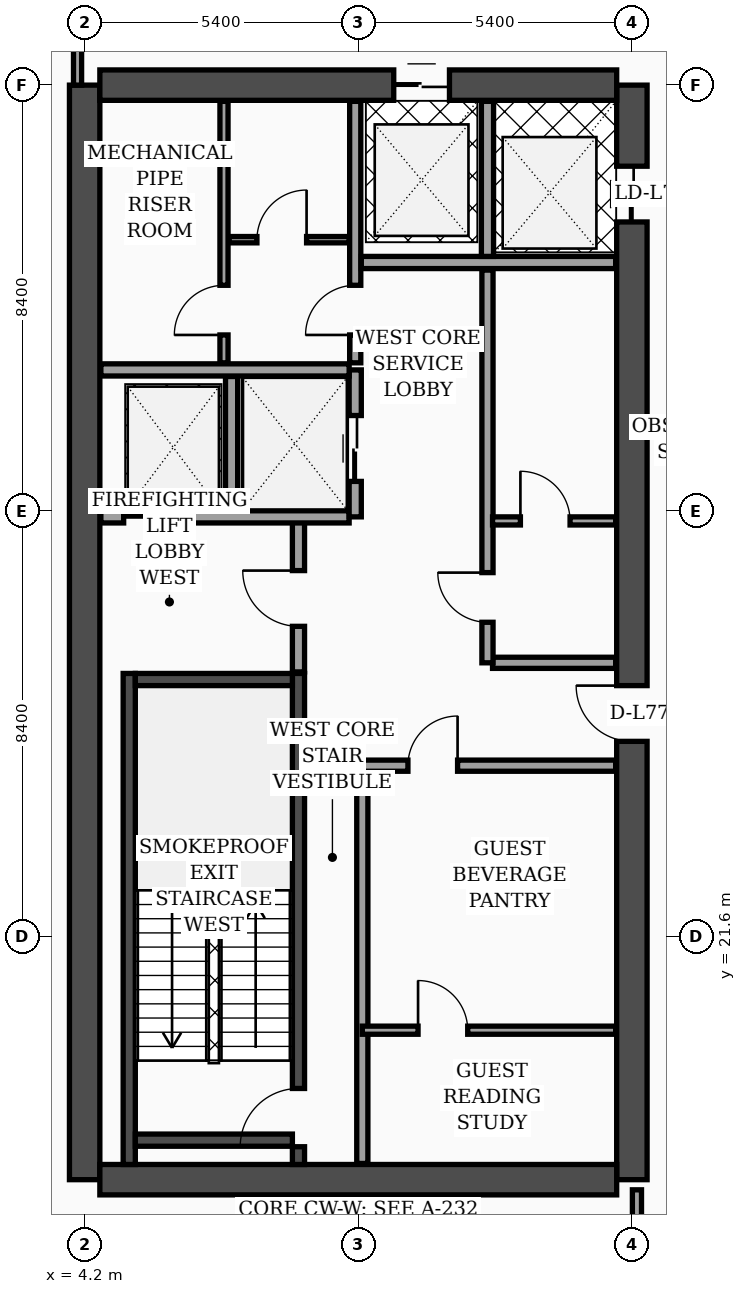
"""IFC4 building model, lengths in metres.
Left out: names, types, materials, properties, quantities, classifications, styles, units other than length and angle.
Written with IfcOpenShell. Run it as: python <this file> out.ifc"""

import sys

from ifc_helpers import new_model, si_unit, direction, frame, frame_2d, origin, place, context, subcontext, project, spatial, rectangle, extrude, element, fill, save


model = new_model("IFC4")
c1 = context("Model", 3, precision=1e-05, world=origin(), true_north=direction((0.0, 1.0)))
c2 = subcontext(c1, "Body", "Model", "MODEL_VIEW")
j1 = project(units=[si_unit("LENGTHUNIT", "METRE"), si_unit("PLANEANGLEUNIT", "RADIAN")], contexts=[c1])
p1 = place(None, origin())
s1 = spatial("IfcSite", under=j1, at=p1, CompositionType="ELEMENT")
p2 = place(p1, origin())
s2 = spatial("IfcBuilding", under=s1, at=p2, CompositionType="ELEMENT")
p3 = place(p2, frame((0.0, 0.0, 311.5)))
s3 = spatial("IfcBuildingStorey", under=s2, at=p3, CompositionType="ELEMENT", Elevation=311.5)
p4 = place(p3, frame((4.2, 16.8, 0.0), z_axis=(0.0, 0.0, 1.0), x_axis=(0.0, 1.0, 0.0)))
e1 = element("IfcWall", 1, at=p4, inside=s3, PredefinedType="SHEAR", context=c2, shape_type="SweptSolid", body=[
    extrude(rectangle(XDim=21.6, YDim=0.6, at=frame_2d((10.8, 0.0))), origin(), (0.0, 0.0, 1.0), 4.26),
])
p5 = place(p3, frame((15.0, 16.8, 0.0), z_axis=(0.0, 0.0, 1.0), x_axis=(0.0, 1.0, 0.0)))
e2 = element("IfcWall", 2, at=p5, inside=s3, PredefinedType="SHEAR", context=c2, shape_type="SweptSolid", body=[
    extrude(rectangle(XDim=21.6, YDim=0.6, at=frame_2d((10.8, 0.0))), origin(), (0.0, 0.0, 1.0), 4.26),
])
p6 = place(p5, frame((8.65, 0.0, 0.0)))
e3 = element("IfcOpeningElement", 3, at=p6, cuts=e2, PredefinedType="OPENING", context=c2, shape_type="SweptSolid", body=[
    extrude(rectangle(XDim=1.1, YDim=2.2, at=frame_2d((0.55, 1.1))), frame((0.0, 0.31, 0.0), z_axis=(0.0, -1.0, 0.0), x_axis=(1.0, 0.0, 0.0)), (0.0, 0.0, 1.0), 0.62),
])
p7 = place(p5, frame((18.9, 0.0, 0.0)))
e4 = element("IfcOpeningElement", 4, at=p7, cuts=e2, PredefinedType="OPENING", context=c2, shape_type="SweptSolid", body=[
    extrude(rectangle(XDim=1.1, YDim=2.2, at=frame_2d((0.55, 1.1))), frame((0.0, 0.31, 0.0), z_axis=(0.0, -1.0, 0.0), x_axis=(1.0, 0.0, 0.0)), (0.0, 0.0, 1.0), 0.62),
])
p8 = place(p3, frame((4.5, 38.4, 0.0), z_axis=(0.0, 0.0, 1.0), x_axis=(1.0, 0.0, 0.0)))
e5 = element("IfcWall", 5, at=p8, inside=s3, PredefinedType="SHEAR", context=c2, shape_type="SweptSolid", body=[
    extrude(rectangle(XDim=10.2, YDim=0.6, at=frame_2d((5.1, 0.0))), origin(), (0.0, 0.0, 1.0), 4.26),
])
p9 = place(p8, frame((5.8, 0.0, 0.0)))
e6 = element("IfcOpeningElement", 6, at=p9, cuts=e5, PredefinedType="OPENING", context=c2, shape_type="SweptSolid", body=[
    extrude(rectangle(XDim=1.1, YDim=2.2, at=frame_2d((0.55, 1.1))), frame((0.0, 0.31, 0.0), z_axis=(0.0, -1.0, 0.0), x_axis=(1.0, 0.0, 0.0)), (0.0, 0.0, 1.0), 0.62),
])
p10 = place(p3, frame((4.5, 16.8, 0.0), z_axis=(0.0, 0.0, 1.0), x_axis=(1.0, 0.0, 0.0)))
e7 = element("IfcWall", 7, at=p10, inside=s3, PredefinedType="SHEAR", context=c2, shape_type="SweptSolid", body=[
    extrude(rectangle(XDim=10.2, YDim=0.6, at=frame_2d((5.1, 0.0))), origin(), (0.0, 0.0, 1.0), 4.26),
])
p11 = place(p3, frame((5.08, 17.1, 0.0), z_axis=(0.0, 0.0, 1.0), x_axis=(0.0, 1.0, 0.0)))
e8 = element("IfcWall", 8, at=p11, inside=s3, PredefinedType="SOLIDWALL", context=c2, shape_type="SweptSolid", body=[
    extrude(rectangle(XDim=9.69, YDim=0.24, at=frame_2d((4.845, 0.0))), origin(), (0.0, 0.0, 1.0), 4.26),
])
p12 = place(p3, frame((8.42, 17.1, 0.0), z_axis=(0.0, 0.0, 1.0), x_axis=(0.0, 1.0, 0.0)))
e9 = element("IfcWall", 9, at=p12, inside=s3, PredefinedType="SOLIDWALL", context=c2, shape_type="SweptSolid", body=[
    extrude(rectangle(XDim=9.69, YDim=0.24, at=frame_2d((4.845, 0.0))), origin(), (0.0, 0.0, 1.0), 4.26),
])
p13 = place(p12, frame((0.35, 0.0, 0.0)))
e10 = element("IfcOpeningElement", 10, at=p13, cuts=e9, PredefinedType="OPENING", context=c2, shape_type="SweptSolid", body=[
    extrude(rectangle(XDim=1.15, YDim=2.2, at=frame_2d((0.575, 1.1))), frame((0.0, 0.13, 0.0), z_axis=(0.0, -1.0, 0.0), x_axis=(1.0, 0.0, 0.0)), (0.0, 0.0, 1.0), 0.26),
])
for number, where, z_axis, x_axis in (
    (11, (5.2, 17.58, 0.0), (0.0, 0.0, 1.0), (1.0, 0.0, 0.0)),
    (12, (5.2, 26.67, 0.0), (0.0, 0.0, 1.0), (1.0, 0.0, 0.0)),
):
    element("IfcWall", number, at=place(p3, frame(where, z_axis=z_axis, x_axis=x_axis)), inside=s3, PredefinedType="SOLIDWALL", context=c2, shape_type="SweptSolid", body=[
        extrude(rectangle(XDim=3.1, YDim=0.24, at=frame_2d((1.55, 0.0))), origin(), (0.0, 0.0, 1.0), 4.26),
    ])
p14 = place(p3, frame((8.42, 26.82, 0.0), z_axis=(0.0, 0.0, 1.0), x_axis=(0.0, 1.0, 0.0)))
e13 = element("IfcWall", 13, at=p14, inside=s3, PredefinedType="SOLIDWALL", context=c2, shape_type="SweptSolid", body=[
    extrude(rectangle(XDim=3.0, YDim=0.24, at=frame_2d((1.5, 0.0))), origin(), (0.0, 0.0, 1.0), 4.26),
])
p15 = place(p14, frame((0.9, 0.0, 0.0)))
e14 = element("IfcOpeningElement", 14, at=p15, cuts=e13, PredefinedType="OPENING", context=c2, shape_type="SweptSolid", body=[
    extrude(rectangle(XDim=1.1, YDim=2.2, at=frame_2d((0.55, 1.1))), frame((0.0, 0.13, 0.0), z_axis=(0.0, -1.0, 0.0), x_axis=(1.0, 0.0, 0.0)), (0.0, 0.0, 1.0), 0.26),
])
p16 = place(p3, frame((4.52, 29.88, 0.0), z_axis=(0.0, 0.0, 1.0), x_axis=(1.0, 0.0, 0.0)))
e15 = element("IfcWall", 15, at=p16, inside=s3, PredefinedType="SOLIDWALL", context=c2, shape_type="SweptSolid", body=[
    extrude(rectangle(XDim=4.9, YDim=0.24, at=frame_2d((2.45, 0.0))), origin(), (0.0, 0.0, 1.0), 4.26),
])
p17 = place(p16, frame((0.45, 0.0, 0.0)))
e16 = element("IfcOpeningElement", 16, at=p17, cuts=e15, PredefinedType="OPENING", context=c2, shape_type="SweptSolid", body=[
    extrude(rectangle(XDim=1.3, YDim=2.35, at=frame_2d((0.65, 1.175))), frame((0.0, 0.13, 0.0), z_axis=(0.0, -1.0, 0.0), x_axis=(1.0, 0.0, 0.0)), (0.0, 0.0, 1.0), 0.26),
])
p18 = place(p3, frame((7.1, 30.02, 0.0), z_axis=(0.0, 0.0, 1.0), x_axis=(0.0, 1.0, 0.0)))
e17 = element("IfcWall", 17, at=p18, inside=s3, PredefinedType="SOLIDWALL", context=c2, shape_type="SweptSolid", body=[
    extrude(rectangle(XDim=2.63, YDim=0.24, at=frame_2d((1.315, 0.0))), origin(), (0.0, 0.0, 1.0), 4.26),
])
p19 = place(p3, frame((9.54, 29.88, 0.0), z_axis=(0.0, 0.0, 1.0), x_axis=(0.0, 1.0, 0.0)))
e18 = element("IfcWall", 18, at=p19, inside=s3, PredefinedType="SOLIDWALL", context=c2, shape_type="SweptSolid", body=[
    extrude(rectangle(XDim=2.9, YDim=0.24, at=frame_2d((1.45, 0.0))), origin(), (0.0, 0.0, 1.0), 4.26),
])
p20 = place(p19, frame((0.7, 0.0, 0.0)))
e19 = element("IfcOpeningElement", 19, at=p20, cuts=e18, PredefinedType="OPENING", context=c2, shape_type="SweptSolid", body=[
    extrude(rectangle(XDim=1.3, YDim=2.35, at=frame_2d((0.65, 1.175))), frame((0.0, 0.13, 0.0), z_axis=(0.0, -1.0, 0.0), x_axis=(1.0, 0.0, 0.0)), (0.0, 0.0, 1.0), 0.26),
])
p21 = place(p3, frame((4.52, 32.78, 0.0), z_axis=(0.0, 0.0, 1.0), x_axis=(1.0, 0.0, 0.0)))
e20 = element("IfcWall", 20, at=p21, inside=s3, PredefinedType="SOLIDWALL", context=c2, shape_type="SweptSolid", body=[
    extrude(rectangle(XDim=4.9, YDim=0.24, at=frame_2d((2.45, 0.0))), origin(), (0.0, 0.0, 1.0), 3.89),
])
p22 = place(p3, frame((9.68, 17.12, 0.0), z_axis=(0.0, 0.0, 1.0), x_axis=(0.0, 1.0, 0.0)))
e21 = element("IfcWall", 21, at=p22, inside=s3, PredefinedType="SOLIDWALL", context=c2, shape_type="SweptSolid", body=[
    extrude(rectangle(XDim=7.88, YDim=0.22, at=frame_2d((3.94, 0.0))), origin(), (0.0, 0.0, 1.0), 4.26),
])
p23 = place(p3, frame((6.95, 32.92, 0.0), z_axis=(0.0, 0.0, 1.0), x_axis=(0.0, 1.0, 0.0)))
e22 = element("IfcWall", 22, at=p23, inside=s3, PredefinedType="PARTITIONING", context=c2, shape_type="SweptSolid", body=[
    extrude(rectangle(XDim=5.16, YDim=0.16, at=frame_2d((2.58, 0.0))), origin(), (0.0, 0.0, 1.0), 4.26),
])
p24 = place(p23, frame((0.55, 0.0, 0.0)))
e23 = element("IfcOpeningElement", 23, at=p24, cuts=e22, PredefinedType="OPENING", context=c2, shape_type="SweptSolid", body=[
    extrude(rectangle(XDim=0.98, YDim=2.15, at=frame_2d((0.49, 1.075))), frame((0.0, 0.09, 0.0), z_axis=(0.0, -1.0, 0.0), x_axis=(1.0, 0.0, 0.0)), (0.0, 0.0, 1.0), 0.18),
])
p25 = place(p3, frame((7.05, 35.35, 0.0), z_axis=(0.0, 0.0, 1.0), x_axis=(1.0, 0.0, 0.0)))
e24 = element("IfcWall", 24, at=p25, inside=s3, PredefinedType="PARTITIONING", context=c2, shape_type="SweptSolid", body=[
    extrude(rectangle(XDim=2.37, YDim=0.125, at=frame_2d((1.185, 0.0))), origin(), (0.0, 0.0, 1.0), 4.26),
])
p26 = place(p25, frame((0.55, 0.0, 0.0)))
e25 = element("IfcOpeningElement", 25, at=p26, cuts=e24, PredefinedType="OPENING", context=c2, shape_type="SweptSolid", body=[
    extrude(rectangle(XDim=0.98, YDim=2.15, at=frame_2d((0.49, 1.075))), frame((0.0, 0.073, 0.0), z_axis=(0.0, -1.0, 0.0), x_axis=(1.0, 0.0, 0.0)), (0.0, 0.0, 1.0), 0.145),
])
p27 = place(p3, frame((9.54, 32.92, 0.0), z_axis=(0.0, 0.0, 1.0), x_axis=(0.0, 1.0, 0.0)))
e26 = element("IfcWall", 26, at=p27, inside=s3, PredefinedType="SOLIDWALL", context=c2, shape_type="SweptSolid", body=[
    extrude(rectangle(XDim=5.16, YDim=0.22, at=frame_2d((2.58, 0.0))), origin(), (0.0, 0.0, 1.0), 4.26),
])
p28 = place(p27, frame((0.55, 0.0, 0.0)))
e27 = element("IfcOpeningElement", 27, at=p28, cuts=e26, PredefinedType="OPENING", context=c2, shape_type="SweptSolid", body=[
    extrude(rectangle(XDim=0.98, YDim=2.15, at=frame_2d((0.49, 1.075))), frame((0.0, 0.12, 0.0), z_axis=(0.0, -1.0, 0.0), x_axis=(1.0, 0.0, 0.0)), (0.0, 0.0, 1.0), 0.24),
])
p29 = place(p3, frame((9.68, 19.75, 0.0), z_axis=(0.0, 0.0, 1.0), x_axis=(1.0, 0.0, 0.0)))
e28 = element("IfcWall", 28, at=p29, inside=s3, PredefinedType="PARTITIONING", context=c2, shape_type="SweptSolid", body=[
    extrude(rectangle(XDim=5.0, YDim=0.16, at=frame_2d((2.5, 0.0))), origin(), (0.0, 0.0, 1.0), 4.26),
])
p30 = place(p29, frame((1.1, 0.0, 0.0)))
e29 = element("IfcOpeningElement", 29, at=p30, cuts=e28, PredefinedType="OPENING", context=c2, shape_type="SweptSolid", body=[
    extrude(rectangle(XDim=0.98, YDim=2.15, at=frame_2d((0.49, 1.075))), frame((0.0, 0.09, 0.0), z_axis=(0.0, -1.0, 0.0), x_axis=(1.0, 0.0, 0.0)), (0.0, 0.0, 1.0), 0.18),
])
p31 = place(p3, frame((9.68, 24.97, 0.0), z_axis=(0.0, 0.0, 1.0), x_axis=(1.0, 0.0, 0.0)))
e30 = element("IfcWall", 30, at=p31, inside=s3, PredefinedType="SOLIDWALL", context=c2, shape_type="SweptSolid", body=[
    extrude(rectangle(XDim=5.0, YDim=0.22, at=frame_2d((2.5, 0.0))), origin(), (0.0, 0.0, 1.0), 3.69),
])
p32 = place(p31, frame((0.9, 0.0, 0.0)))
e31 = element("IfcOpeningElement", 31, at=p32, cuts=e30, PredefinedType="OPENING", context=c2, shape_type="SweptSolid", body=[
    extrude(rectangle(XDim=0.98, YDim=2.15, at=frame_2d((0.49, 1.075))), frame((0.0, 0.12, 0.0), z_axis=(0.0, -1.0, 0.0), x_axis=(1.0, 0.0, 0.0)), (0.0, 0.0, 1.0), 0.24),
])
p33 = place(p3, frame((12.25, 27.0, 0.0), z_axis=(0.0, 0.0, 1.0), x_axis=(1.0, 0.0, 0.0)))
e32 = element("IfcWall", 32, at=p33, inside=s3, PredefinedType="SOLIDWALL", context=c2, shape_type="SweptSolid", body=[
    extrude(rectangle(XDim=2.43, YDim=0.22, at=frame_2d((1.215, 0.0))), origin(), (0.0, 0.0, 1.0), 4.26),
])
p34 = place(p3, frame((12.15, 27.0, 0.0), z_axis=(0.0, 0.0, 1.0), x_axis=(0.0, 1.0, 0.0)))
e33 = element("IfcWall", 33, at=p34, inside=s3, PredefinedType="SOLIDWALL", context=c2, shape_type="SweptSolid", body=[
    extrude(rectangle(XDim=7.75, YDim=0.22, at=frame_2d((3.875, 0.0))), origin(), (0.0, 0.0, 1.0), 4.26),
])
p35 = place(p34, frame((0.8, 0.0, 0.0)))
e34 = element("IfcOpeningElement", 34, at=p35, cuts=e33, PredefinedType="OPENING", context=c2, shape_type="SweptSolid", body=[
    extrude(rectangle(XDim=0.98, YDim=2.15, at=frame_2d((0.49, 1.075))), frame((0.0, 0.12, 0.0), z_axis=(0.0, -1.0, 0.0), x_axis=(1.0, 0.0, 0.0)), (0.0, 0.0, 1.0), 0.24),
])
p36 = place(p3, frame((12.25, 29.8, 0.0), z_axis=(0.0, 0.0, 1.0), x_axis=(1.0, 0.0, 0.0)))
e35 = element("IfcWall", 35, at=p36, inside=s3, PredefinedType="PARTITIONING", context=c2, shape_type="SweptSolid", body=[
    extrude(rectangle(XDim=2.43, YDim=0.16, at=frame_2d((1.215, 0.0))), origin(), (0.0, 0.0, 1.0), 4.26),
])
p37 = place(p36, frame((0.55, 0.0, 0.0)))
e36 = element("IfcOpeningElement", 36, at=p37, cuts=e35, PredefinedType="OPENING", context=c2, shape_type="SweptSolid", body=[
    extrude(rectangle(XDim=0.98, YDim=2.15, at=frame_2d((0.49, 1.075))), frame((0.0, 0.09, 0.0), z_axis=(0.0, -1.0, 0.0), x_axis=(1.0, 0.0, 0.0)), (0.0, 0.0, 1.0), 0.18),
])
p38 = place(p3, frame((9.66, 34.9, 0.0), z_axis=(0.0, 0.0, 1.0), x_axis=(1.0, 0.0, 0.0)))
e37 = element("IfcWall", 37, at=p38, inside=s3, PredefinedType="SOLIDWALL", context=c2, shape_type="SweptSolid", body=[
    extrude(rectangle(XDim=5.02, YDim=0.24, at=frame_2d((2.51, 0.0))), origin(), (0.0, 0.0, 1.0), 4.26),
])
p39 = place(p3, frame((12.15, 35.02, 0.0), z_axis=(0.0, 0.0, 1.0), x_axis=(0.0, 1.0, 0.0)))
e38 = element("IfcWall", 38, at=p39, inside=s3, PredefinedType="SOLIDWALL", context=c2, shape_type="SweptSolid", body=[
    extrude(rectangle(XDim=3.06, YDim=0.24, at=frame_2d((1.53, 0.0))), origin(), (0.0, 0.0, 1.0), 4.26),
])
p40 = place(p3, frame((4.06, 38.4, 0.0), z_axis=(0.0, 0.0, 1.0), x_axis=(0.0, 1.0, 0.0)))
e39 = element("IfcWall", 39, at=p40, inside=s3, PredefinedType="PARTITIONING", context=c2, shape_type="SweptSolid", body=[
    extrude(rectangle(XDim=5.5, YDim=0.16, at=frame_2d((2.75, 0.0))), origin(), (0.0, 0.0, 1.0), 3.69),
])
p41 = place(p40, frame((3.2, 0.0, 0.0)))
e40 = element("IfcOpeningElement", 40, at=p41, cuts=e39, PredefinedType="OPENING", context=c2, shape_type="SweptSolid", body=[
    extrude(rectangle(XDim=1.02, YDim=2.2, at=frame_2d((0.51, 1.1))), frame((0.0, 0.09, 0.0), z_axis=(0.0, -1.0, 0.0), x_axis=(1.0, 0.0, 0.0)), (0.0, 0.0, 1.0), 0.18),
])
p42 = place(p3, frame((15.1, 2.6, 0.0), z_axis=(0.0, 0.0, 1.0), x_axis=(0.0, 1.0, 0.0)))
e41 = element("IfcWall", 41, at=p42, inside=s3, PredefinedType="PARTITIONING", context=c2, shape_type="SweptSolid", body=[
    extrude(rectangle(XDim=14.0, YDim=0.18, at=frame_2d((7.0, 0.0))), origin(), (0.0, 0.0, 1.0), 3.29),
])
p43 = place(p42, frame((11.8, 0.0, 0.0)))
e42 = element("IfcOpeningElement", 42, at=p43, cuts=e41, PredefinedType="OPENING", context=c2, shape_type="SweptSolid", body=[
    extrude(rectangle(XDim=1.5, YDim=2.22, at=frame_2d((0.75, 1.11))), frame((0.0, 0.1, 0.0), z_axis=(0.0, -1.0, 0.0), x_axis=(1.0, 0.0, 0.0)), (0.0, 0.0, 1.0), 0.2),
])
p44 = place(p15, origin())
e43 = element("IfcDoor", 43, at=p44, inside=s3, OperationType="SINGLE_SWING_RIGHT", PredefinedType="DOOR", context=c2, shape_type="SweptSolid", body=[
    extrude(rectangle(XDim=1.1, YDim=2.2, at=frame_2d((0.55, 1.1))), frame((0.0, 0.025, 0.0), z_axis=(0.0, -1.0, 0.0), x_axis=(1.0, 0.0, 0.0)), (0.0, 0.0, 1.0), 0.05),
])
fill(e14, e43)
p45 = place(p17, origin())
e44 = element("IfcDoor", 44, at=p45, inside=s3, OperationType="DOUBLE_DOOR_SLIDING", PredefinedType="DOOR", context=c2, shape_type="SweptSolid", body=[
    extrude(rectangle(XDim=1.3, YDim=2.35, at=frame_2d((0.65, 1.175))), frame((0.0, 0.025, 0.0), z_axis=(0.0, -1.0, 0.0), x_axis=(1.0, 0.0, 0.0)), (0.0, 0.0, 1.0), 0.05),
])
fill(e16, e44)
p46 = place(p20, origin())
e45 = element("IfcDoor", 45, at=p46, inside=s3, OperationType="DOUBLE_DOOR_SLIDING", PredefinedType="DOOR", context=c2, shape_type="SweptSolid", body=[
    extrude(rectangle(XDim=1.3, YDim=2.35, at=frame_2d((0.65, 1.175))), frame((0.0, 0.025, 0.0), z_axis=(0.0, -1.0, 0.0), x_axis=(1.0, 0.0, 0.0)), (0.0, 0.0, 1.0), 0.05),
])
fill(e19, e45)
p47 = place(p24, origin())
e46 = element("IfcDoor", 46, at=p47, inside=s3, OperationType="SINGLE_SWING_LEFT", PredefinedType="DOOR", context=c2, shape_type="SweptSolid", body=[
    extrude(rectangle(XDim=0.98, YDim=2.15, at=frame_2d((0.49, 1.075))), frame((0.0, 0.025, 0.0), z_axis=(0.0, -1.0, 0.0), x_axis=(1.0, 0.0, 0.0)), (0.0, 0.0, 1.0), 0.05),
])
fill(e23, e46)
p48 = place(p26, origin())
e47 = element("IfcDoor", 47, at=p48, inside=s3, OperationType="SINGLE_SWING_RIGHT", PredefinedType="DOOR", context=c2, shape_type="SweptSolid", body=[
    extrude(rectangle(XDim=0.98, YDim=2.15, at=frame_2d((0.49, 1.075))), frame((0.0, 0.025, 0.0), z_axis=(0.0, -1.0, 0.0), x_axis=(1.0, 0.0, 0.0)), (0.0, 0.0, 1.0), 0.05),
])
fill(e25, e47)
p49 = place(p28, origin())
e48 = element("IfcDoor", 48, at=p49, inside=s3, OperationType="SINGLE_SWING_LEFT", PredefinedType="DOOR", context=c2, shape_type="SweptSolid", body=[
    extrude(rectangle(XDim=0.98, YDim=2.15, at=frame_2d((0.49, 1.075))), frame((0.0, 0.025, 0.0), z_axis=(0.0, -1.0, 0.0), x_axis=(1.0, 0.0, 0.0)), (0.0, 0.0, 1.0), 0.05),
])
fill(e27, e48)
p50 = place(p30, origin())
e49 = element("IfcDoor", 49, at=p50, inside=s3, OperationType="SINGLE_SWING_LEFT", PredefinedType="DOOR", context=c2, shape_type="SweptSolid", body=[
    extrude(rectangle(XDim=0.98, YDim=2.15, at=frame_2d((0.49, 1.075))), frame((0.0, 0.025, 0.0), z_axis=(0.0, -1.0, 0.0), x_axis=(1.0, 0.0, 0.0)), (0.0, 0.0, 1.0), 0.05),
])
fill(e29, e49)
p51 = place(p32, origin())
e50 = element("IfcDoor", 50, at=p51, inside=s3, OperationType="SINGLE_SWING_RIGHT", PredefinedType="DOOR", context=c2, shape_type="SweptSolid", body=[
    extrude(rectangle(XDim=0.98, YDim=2.15, at=frame_2d((0.49, 1.075))), frame((0.0, 0.025, 0.0), z_axis=(0.0, -1.0, 0.0), x_axis=(1.0, 0.0, 0.0)), (0.0, 0.0, 1.0), 0.05),
])
fill(e31, e50)
p52 = place(p35, origin())
e51 = element("IfcDoor", 51, at=p52, inside=s3, OperationType="SINGLE_SWING_RIGHT", PredefinedType="DOOR", context=c2, shape_type="SweptSolid", body=[
    extrude(rectangle(XDim=0.98, YDim=2.15, at=frame_2d((0.49, 1.075))), frame((0.0, 0.025, 0.0), z_axis=(0.0, -1.0, 0.0), x_axis=(1.0, 0.0, 0.0)), (0.0, 0.0, 1.0), 0.05),
])
fill(e34, e51)
p53 = place(p37, origin())
e52 = element("IfcDoor", 52, at=p53, inside=s3, OperationType="SINGLE_SWING_LEFT", PredefinedType="DOOR", context=c2, shape_type="SweptSolid", body=[
    extrude(rectangle(XDim=0.98, YDim=2.15, at=frame_2d((0.49, 1.075))), frame((0.0, 0.025, 0.0), z_axis=(0.0, -1.0, 0.0), x_axis=(1.0, 0.0, 0.0)), (0.0, 0.0, 1.0), 0.05),
])
fill(e36, e52)
p54 = place(p13, origin())
e53 = element("IfcDoor", 53, at=p54, inside=s3, OperationType="SINGLE_SWING_LEFT", PredefinedType="DOOR", context=c2, shape_type="SweptSolid", body=[
    extrude(rectangle(XDim=1.15, YDim=2.2, at=frame_2d((0.575, 1.1))), frame((0.0, 0.025, 0.0), z_axis=(0.0, -1.0, 0.0), x_axis=(1.0, 0.0, 0.0)), (0.0, 0.0, 1.0), 0.05),
])
fill(e10, e53)
p55 = place(p6, origin())
e54 = element("IfcDoor", 54, at=p55, inside=s3, OperationType="SINGLE_SWING_RIGHT", PredefinedType="DOOR", context=c2, shape_type="SweptSolid", body=[
    extrude(rectangle(XDim=1.1, YDim=2.2, at=frame_2d((0.55, 1.1))), frame((0.0, 0.025, 0.0), z_axis=(0.0, -1.0, 0.0), x_axis=(1.0, 0.0, 0.0)), (0.0, 0.0, 1.0), 0.05),
])
fill(e3, e54)
p56 = place(p7, origin())
e55 = element("IfcDoor", 55, at=p56, inside=s3, OperationType="DOUBLE_DOOR_SLIDING", PredefinedType="DOOR", context=c2, shape_type="SweptSolid", body=[
    extrude(rectangle(XDim=1.1, YDim=2.2, at=frame_2d((0.55, 1.1))), frame((0.0, 0.025, 0.0), z_axis=(0.0, -1.0, 0.0), x_axis=(1.0, 0.0, 0.0)), (0.0, 0.0, 1.0), 0.05),
])
fill(e4, e55)
p57 = place(p9, origin())
e56 = element("IfcDoor", 56, at=p57, inside=s3, OperationType="DOUBLE_DOOR_SLIDING", PredefinedType="DOOR", context=c2, shape_type="SweptSolid", body=[
    extrude(rectangle(XDim=1.1, YDim=2.2, at=frame_2d((0.55, 1.1))), frame((0.0, 0.025, 0.0), z_axis=(0.0, -1.0, 0.0), x_axis=(1.0, 0.0, 0.0)), (0.0, 0.0, 1.0), 0.05),
])
fill(e6, e56)
save(model, sys.argv[1])
